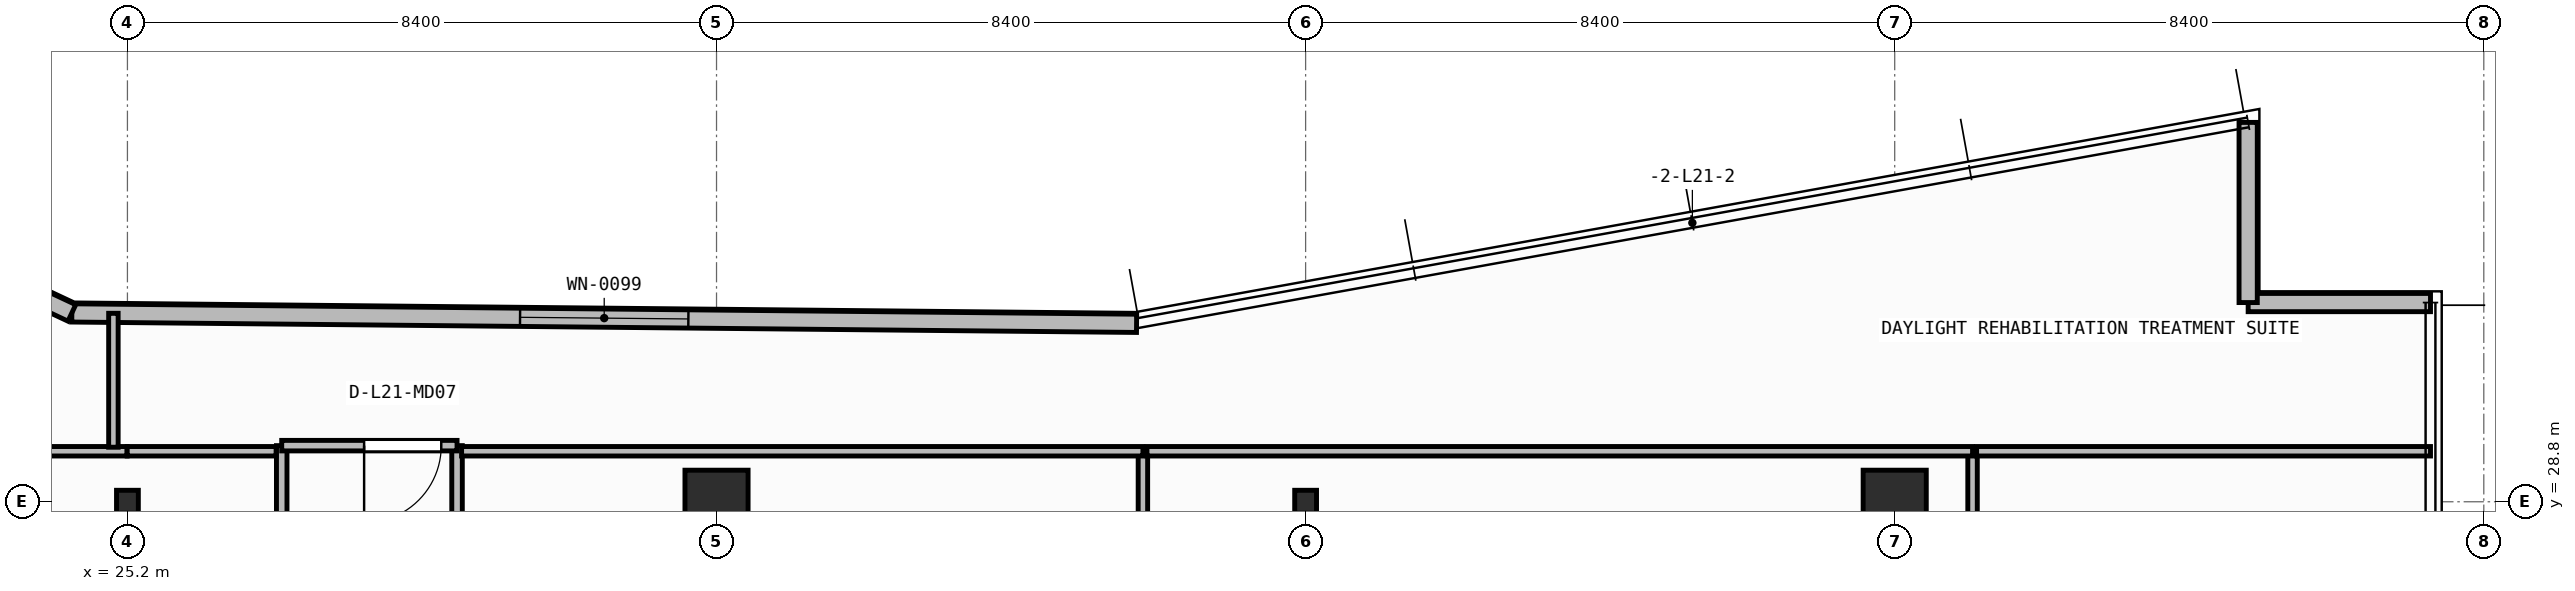
"""IFC4 building model, lengths in metres.
Left out: names, types, materials, properties, quantities, classifications, styles, units other than length and angle.
Written with IfcOpenShell. Run it as: python <this file> out.ifc"""

import sys

from ifc_helpers import new_model, si_unit, direction, frame, frame_2d, origin, origin_2d, place, context, subcontext, project, spatial, rectangle, i_section, extrude, element, fill, save


model = new_model("IFC4")
c1 = context("Model", 3, precision=1e-05, world=origin(), true_north=direction((0.0, 1.0)))
c2 = subcontext(c1, "Body", "Model", "MODEL_VIEW")
j1 = project(units=[si_unit("LENGTHUNIT", "METRE"), si_unit("PLANEANGLEUNIT", "RADIAN")], contexts=[c1])
p1 = place(None, origin())
s1 = spatial("IfcSite", under=j1, at=p1, CompositionType="ELEMENT")
p2 = place(p1, origin())
s2 = spatial("IfcBuilding", under=s1, at=p2, CompositionType="ELEMENT")
p3 = place(p2, frame((0.0, 0.0, 85.7)))
s3 = spatial("IfcBuildingStorey", under=s2, at=p3, CompositionType="ELEMENT", Elevation=85.7)
p4 = place(p3, frame((25.2, 28.8, 0.0), z_axis=(0.0, 0.0, 1.0), x_axis=(1.0, 0.0, 0.0)))
e1 = element("IfcColumn", 1, at=p4, inside=s3, PredefinedType="COLUMN", context=c2, shape_type="SweptSolid", body=[
    extrude(i_section(OverallWidth=0.311, OverallDepth=0.327, WebThickness=0.016, FlangeThickness=0.025, FilletRadius=0.017, at=origin_2d()), origin(), (0.0, 0.0, 1.0), 3.95),
])
p5 = place(p3, frame((33.6, 28.8, 0.0), z_axis=(0.0, 0.0, 1.0), x_axis=(1.0, 0.0, 0.0)))
e2 = element("IfcColumn", 2, at=p5, inside=s3, PredefinedType="COLUMN", context=c2, shape_type="SweptSolid", body=[
    extrude(rectangle(XDim=0.9, YDim=0.9, at=origin_2d()), origin(), (0.0, 0.0, 1.0), 3.95),
])
p6 = place(p3, frame((42.0, 28.8, 0.0), z_axis=(0.0, 0.0, 1.0), x_axis=(1.0, 0.0, 0.0)))
e3 = element("IfcColumn", 3, at=p6, inside=s3, PredefinedType="COLUMN", context=c2, shape_type="SweptSolid", body=[
    extrude(i_section(OverallWidth=0.311, OverallDepth=0.327, WebThickness=0.016, FlangeThickness=0.025, FilletRadius=0.017, at=origin_2d()), origin(), (0.0, 0.0, 1.0), 3.95),
])
p7 = place(p3, frame((50.4, 28.8, 0.0), z_axis=(0.0, 0.0, 1.0), x_axis=(1.0, 0.0, 0.0)))
e4 = element("IfcColumn", 4, at=p7, inside=s3, PredefinedType="COLUMN", context=c2, shape_type="SweptSolid", body=[
    extrude(rectangle(XDim=0.9, YDim=0.9, at=origin_2d()), origin(), (0.0, 0.0, 1.0), 3.95),
])
p8 = place(p3, frame((58.04, 31.64, 0.0), z_axis=(0.0, 0.0, 1.0), x_axis=(-1.0, 0.0, 0.0)))
e5 = element("IfcWall", 5, at=p8, inside=s3, PredefinedType="STANDARD", context=c2, shape_type="SweptSolid", body=[
    extrude(rectangle(XDim=2.6, YDim=0.26, at=frame_2d((1.3, 0.0))), origin(), (0.0, 0.0, 1.0), 3.71),
])
p9 = place(p3, frame((55.44, 31.64, 0.0), z_axis=(0.0, 0.0, 1.0), x_axis=(0.0, 1.0, 0.0)))
e6 = element("IfcWall", 6, at=p9, inside=s3, PredefinedType="STANDARD", context=c2, shape_type="SweptSolid", body=[
    extrude(rectangle(XDim=2.569, YDim=0.26, at=frame_2d((1.284, 0.0))), origin(), (0.0, 0.0, 1.0), 3.71),
])
p10 = place(p3, frame((39.59, 31.344, 0.0), z_axis=(0.0, 0.0, 1.0), x_axis=(-0.999952362926, 0.009760731435, 0.0)))
e7 = element("IfcWall", 7, at=p10, inside=s3, PredefinedType="STANDARD", context=c2, shape_type="SweptSolid", body=[
    extrude(rectangle(XDim=15.183, YDim=0.26, at=frame_2d((7.591, 0.0))), origin(), (0.0, 0.0, 1.0), 3.71),
])
p11 = place(p10, frame((6.391, 0.0, 0.9)))
e8 = element("IfcOpeningElement", 8, at=p11, cuts=e7, PredefinedType="OPENING", context=c2, shape_type="SweptSolid", body=[
    extrude(rectangle(XDim=2.4, YDim=1.65, at=frame_2d((1.2, 0.825))), frame((0.0, 0.14, 0.0), z_axis=(0.0, -1.0, 0.0), x_axis=(1.0, 0.0, 0.0)), (0.0, 0.0, 1.0), 0.28),
])
p12 = place(p3, frame((24.408, 31.492, 0.0), z_axis=(0.0, 0.0, 1.0), x_axis=(-0.905396522918, 0.424566998585, 0.0)))
e9 = element("IfcWall", 9, at=p12, inside=s3, PredefinedType="STANDARD", context=c2, shape_type="SweptSolid", body=[
    extrude(rectangle(XDim=14.189, YDim=0.26, at=frame_2d((7.095, 0.0))), origin(), (0.0, 0.0, 1.0), 3.71),
])
p13 = place(p12, frame((5.895, 0.0, 0.9)))
e10 = element("IfcOpeningElement", 10, at=p13, cuts=e9, PredefinedType="OPENING", context=c2, shape_type="SweptSolid", body=[
    extrude(rectangle(XDim=2.4, YDim=1.65, at=frame_2d((1.2, 0.825))), frame((0.0, 0.14, 0.0), z_axis=(0.0, -1.0, 0.0), x_axis=(1.0, 0.0, 0.0)), (0.0, 0.0, 1.0), 0.28),
])
p14 = place(p3, frame((27.4, 29.6, 0.0), z_axis=(0.0, 0.0, 1.0), x_axis=(0.0, -1.0, 0.0)))
e11 = element("IfcWall", 11, at=p14, inside=s3, PredefinedType="PARTITIONING", context=c2, shape_type="SweptSolid", body=[
    extrude(rectangle(XDim=7.232, YDim=0.15, at=frame_2d((3.616, 0.0))), origin(), (0.0, 0.0, 1.0), 3.71),
])
p15 = place(p14, frame((4.499, 0.0, 0.0)))
e12 = element("IfcOpeningElement", 12, at=p15, cuts=e11, PredefinedType="OPENING", context=c2, shape_type="SweptSolid", body=[
    extrude(rectangle(XDim=1.1, YDim=2.1, at=frame_2d((0.55, 1.05))), frame((0.0, 0.085, 0.0), z_axis=(0.0, -1.0, 0.0), x_axis=(1.0, 0.0, 0.0)), (0.0, 0.0, 1.0), 0.17),
])
p16 = place(p3, frame((29.9, 19.968, 0.0), z_axis=(0.0, 0.0, 1.0), x_axis=(0.0, 1.0, 0.0)))
e13 = element("IfcWall", 13, at=p16, inside=s3, PredefinedType="PARTITIONING", context=c2, shape_type="SweptSolid", body=[
    extrude(rectangle(XDim=9.632, YDim=0.15, at=frame_2d((4.816, 0.0))), origin(), (0.0, 0.0, 1.0), 3.71),
])
p17 = place(p16, frame((4.266, 0.0, 0.0)))
e14 = element("IfcOpeningElement", 14, at=p17, cuts=e13, PredefinedType="OPENING", context=c2, shape_type="SweptSolid", body=[
    extrude(rectangle(XDim=1.1, YDim=2.1, at=frame_2d((0.55, 1.05))), frame((0.0, 0.085, 0.0), z_axis=(0.0, -1.0, 0.0), x_axis=(1.0, 0.0, 0.0)), (0.0, 0.0, 1.0), 0.17),
])
p18 = place(p3, frame((29.9, 29.6, 0.0), z_axis=(0.0, 0.0, 1.0), x_axis=(-1.0, 0.0, 0.0)))
e15 = element("IfcWall", 15, at=p18, inside=s3, PredefinedType="PARTITIONING", context=c2, shape_type="SweptSolid", body=[
    extrude(rectangle(XDim=2.5, YDim=0.15, at=frame_2d((1.25, 0.0))), origin(), (0.0, 0.0, 1.0), 3.71),
])
p19 = place(p18, frame((0.225, 0.0, 0.0)))
e16 = element("IfcOpeningElement", 16, at=p19, cuts=e15, PredefinedType="OPENING", context=c2, shape_type="SweptSolid", body=[
    extrude(rectangle(XDim=1.1, YDim=2.1, at=frame_2d((0.55, 1.05))), frame((0.0, 0.085, 0.0), z_axis=(0.0, -1.0, 0.0), x_axis=(1.0, 0.0, 0.0)), (0.0, 0.0, 1.0), 0.17),
])
p20 = place(p3, frame((25.195, 29.52, 0.0), z_axis=(0.0, 0.0, 1.0), x_axis=(-1.0, 0.0, 0.0)))
e17 = element("IfcWall", 17, at=p20, inside=s3, PredefinedType="PARTITIONING", context=c2, shape_type="SweptSolid", body=[
    extrude(rectangle(XDim=13.147, YDim=0.135, at=frame_2d((6.573, 0.0))), origin(), (0.0, 0.0, 1.0), 3.71),
])
p21 = place(p3, frame((27.32, 29.52, 0.0), z_axis=(0.0, 0.0, 1.0), x_axis=(-1.0, 0.0, 0.0)))
e18 = element("IfcWall", 18, at=p21, inside=s3, PredefinedType="PARTITIONING", context=c2, shape_type="SweptSolid", body=[
    extrude(rectangle(XDim=2.124, YDim=0.135, at=frame_2d((1.062, 0.0))), origin(), (0.0, 0.0, 1.0), 3.71),
])
p22 = place(p3, frame((39.68, 19.798, 0.0), z_axis=(0.0, 0.0, 1.0), x_axis=(0.0, 1.0, 0.0)))
e19 = element("IfcWall", 19, at=p22, inside=s3, PredefinedType="PARTITIONING", context=c2, shape_type="SweptSolid", body=[
    extrude(rectangle(XDim=9.722, YDim=0.135, at=frame_2d((4.861, 0.0))), origin(), (0.0, 0.0, 1.0), 3.71),
])
p23 = place(p22, frame((4.311, 0.0, 0.0)))
e20 = element("IfcOpeningElement", 20, at=p23, cuts=e19, PredefinedType="OPENING", context=c2, shape_type="SweptSolid", body=[
    extrude(rectangle(XDim=1.1, YDim=2.1, at=frame_2d((0.55, 1.05))), frame((0.0, 0.077, 0.0), z_axis=(0.0, -1.0, 0.0), x_axis=(1.0, 0.0, 0.0)), (0.0, 0.0, 1.0), 0.155),
])
p24 = place(p3, frame((39.68, 29.52, 0.0), z_axis=(0.0, 0.0, 1.0), x_axis=(-1.0, 0.0, 0.0)))
e21 = element("IfcWall", 21, at=p24, inside=s3, PredefinedType="PARTITIONING", context=c2, shape_type="SweptSolid", body=[
    extrude(rectangle(XDim=9.715, YDim=0.135, at=frame_2d((4.857, 0.0))), origin(), (0.0, 0.0, 1.0), 3.71),
])
p25 = place(p3, frame((51.51, 19.798, 0.0), z_axis=(0.0, 0.0, 1.0), x_axis=(0.0, 1.0, 0.0)))
e22 = element("IfcWall", 22, at=p25, inside=s3, PredefinedType="PARTITIONING", context=c2, shape_type="SweptSolid", body=[
    extrude(rectangle(XDim=9.722, YDim=0.135, at=frame_2d((4.861, 0.0))), origin(), (0.0, 0.0, 1.0), 3.71),
])
p26 = place(p25, frame((4.311, 0.0, 0.0)))
e23 = element("IfcOpeningElement", 23, at=p26, cuts=e22, PredefinedType="OPENING", context=c2, shape_type="SweptSolid", body=[
    extrude(rectangle(XDim=1.1, YDim=2.1, at=frame_2d((0.55, 1.05))), frame((0.0, 0.077, 0.0), z_axis=(0.0, -1.0, 0.0), x_axis=(1.0, 0.0, 0.0)), (0.0, 0.0, 1.0), 0.155),
])
p27 = place(p3, frame((51.51, 29.52, 0.0), z_axis=(0.0, 0.0, 1.0), x_axis=(-1.0, 0.0, 0.0)))
e24 = element("IfcWall", 24, at=p27, inside=s3, PredefinedType="PARTITIONING", context=c2, shape_type="SweptSolid", body=[
    extrude(rectangle(XDim=11.772, YDim=0.135, at=frame_2d((5.886, 0.0))), origin(), (0.0, 0.0, 1.0), 3.71),
])
p28 = place(p3, frame((58.04, 29.52, 0.0), z_axis=(0.0, 0.0, 1.0), x_axis=(-1.0, 0.0, 0.0)))
e25 = element("IfcWall", 25, at=p28, inside=s3, PredefinedType="PARTITIONING", context=c2, shape_type="SweptSolid", body=[
    extrude(rectangle(XDim=6.473, YDim=0.135, at=frame_2d((3.236, 0.0))), origin(), (0.0, 0.0, 1.0), 3.71),
])
p29 = place(p3, frame((25.0, 29.577, 0.0), z_axis=(0.0, 0.0, 1.0), x_axis=(0.0, 1.0, 0.0)))
e26 = element("IfcWall", 26, at=p29, inside=s3, PredefinedType="PARTITIONING", context=c2, shape_type="SweptSolid", body=[
    extrude(rectangle(XDim=1.909, YDim=0.135, at=frame_2d((0.955, 0.0))), origin(), (0.0, 0.0, 1.0), 3.71),
])
p30 = place(p11, origin())
e27 = element("IfcWindow", 27, at=p30, inside=s3, PartitioningType="SINGLE_PANEL", PredefinedType="WINDOW", context=c2, shape_type="SweptSolid", body=[
    extrude(rectangle(XDim=2.4, YDim=1.65, at=frame_2d((1.2, 0.825))), frame((0.0, 0.03, 0.0), z_axis=(0.0, -1.0, 0.0), x_axis=(1.0, 0.0, 0.0)), (0.0, 0.0, 1.0), 0.06),
])
fill(e8, e27)
p31 = place(p19, origin())
e28 = element("IfcDoor", 28, at=p31, inside=s3, OperationType="SINGLE_SWING_RIGHT", PredefinedType="DOOR", context=c2, shape_type="SweptSolid", body=[
    extrude(rectangle(XDim=1.1, YDim=2.1, at=frame_2d((0.55, 1.05))), frame((0.0, 0.025, 0.0), z_axis=(0.0, -1.0, 0.0), x_axis=(1.0, 0.0, 0.0)), (0.0, 0.0, 1.0), 0.05),
])
fill(e16, e28)
save(model, sys.argv[1])
